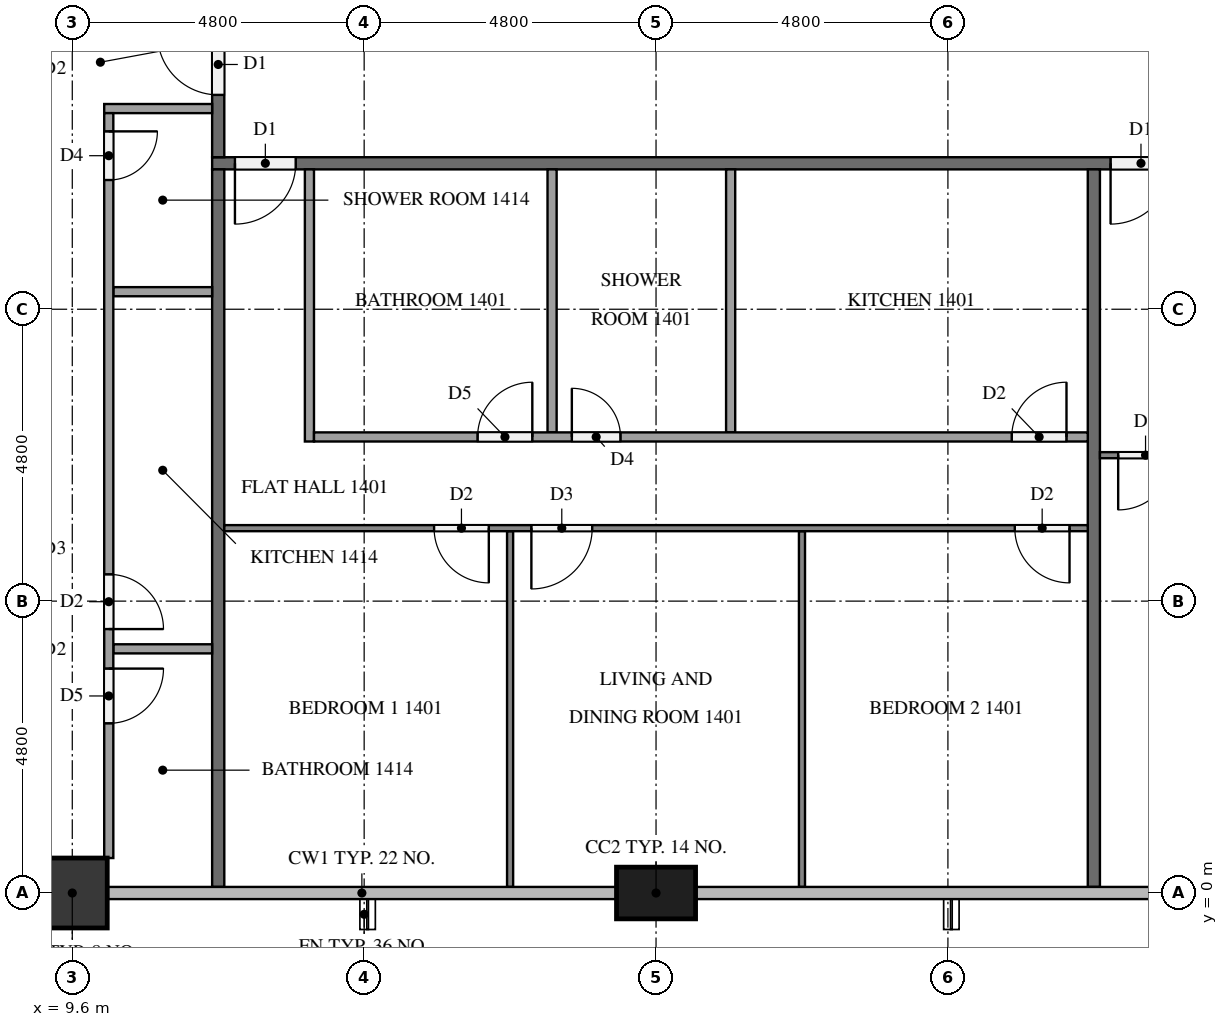
"""IFC4 building model, lengths in metres.
Left out: names, types, materials, properties, quantities, classifications, styles, units other than length and angle.
Written with IfcOpenShell. Run it as: python <this file> out.ifc"""

import sys

from ifc_helpers import new_model, si_unit, direction, frame, frame_2d, origin, origin_2d, place, context, subcontext, project, spatial, rectangle, extrude, element, fill, save


model = new_model("IFC4")
c1 = context("Model", 3, precision=1e-05, world=origin(), true_north=direction((0.0, 1.0)))
c2 = subcontext(c1, "Body", "Model", "MODEL_VIEW")
j1 = project(units=[si_unit("LENGTHUNIT", "METRE"), si_unit("PLANEANGLEUNIT", "RADIAN")], contexts=[c1])
p1 = place(None, origin())
s1 = spatial("IfcSite", under=j1, at=p1, CompositionType="ELEMENT")
p2 = place(p1, origin())
s2 = spatial("IfcBuilding", under=s1, at=p2, CompositionType="ELEMENT")
p3 = place(p2, frame((0.0, 0.0, 59.3)))
s3 = spatial("IfcBuildingStorey", under=s2, at=p3, CompositionType="ELEMENT", Elevation=59.3)
p4 = place(p3, frame((9.6, 0.0, 0.0), z_axis=(0.0, 0.0, 1.0), x_axis=(1.0, 0.0, 0.0)))
e1 = element("IfcColumn", 1, at=p4, inside=s3, PredefinedType="COLUMN", context=c2, shape_type="SweptSolid", body=[
    extrude(rectangle(XDim=1.15, YDim=1.15, at=origin_2d()), origin(), (0.0, 0.0, 1.0), 3.2),
])
p5 = place(p3, frame((19.2, 0.0, 0.0), z_axis=(0.0, 0.0, 1.0), x_axis=(1.0, 0.0, 0.0)))
e2 = element("IfcColumn", 2, at=p5, inside=s3, PredefinedType="COLUMN", context=c2, shape_type="SweptSolid", body=[
    extrude(rectangle(XDim=1.3, YDim=0.85, at=origin_2d()), origin(), (0.0, 0.0, 1.0), 3.2),
])
p6 = place(p3, frame((50.5, 12.0, 0.0), z_axis=(0.0, 0.0, 1.0), x_axis=(-1.0, 0.0, 0.0)))
e3 = element("IfcWall", 3, at=p6, inside=s3, PredefinedType="PARTITIONING", context=c2, shape_type="SweptSolid", body=[
    extrude(rectangle(XDim=38.6, YDim=0.2, at=frame_2d((19.3, 0.0))), origin(), (0.0, 0.0, 1.0), 3.2),
])
p7 = place(p6, frame((37.225, 0.0, 0.0)))
e4 = element("IfcOpeningElement", 4, at=p7, cuts=e3, PredefinedType="OPENING", context=c2, shape_type="SweptSolid", body=[
    extrude(rectangle(XDim=1.0, YDim=2.1, at=frame_2d((0.5, 1.05))), frame((0.0, 0.11, 0.0), z_axis=(0.0, -1.0, 0.0), x_axis=(1.0, 0.0, 0.0)), (0.0, 0.0, 1.0), 0.22),
])
p8 = place(p6, frame((22.825, 0.0, 0.0)))
e5 = element("IfcOpeningElement", 5, at=p8, cuts=e3, PredefinedType="OPENING", context=c2, shape_type="SweptSolid", body=[
    extrude(rectangle(XDim=1.0, YDim=2.1, at=frame_2d((0.5, 1.05))), frame((0.0, 0.11, 0.0), z_axis=(0.0, -1.0, 0.0), x_axis=(1.0, 0.0, 0.0)), (0.0, 0.0, 1.0), 0.22),
])
p9 = place(p6, frame((0.375, 0.0, 0.0)))
e6 = element("IfcOpeningElement", 6, at=p9, cuts=e3, PredefinedType="OPENING", context=c2, shape_type="SweptSolid", body=[
    extrude(rectangle(XDim=1.0, YDim=2.1, at=frame_2d((0.5, 1.05))), frame((0.0, 0.11, 0.0), z_axis=(0.0, -1.0, 0.0), x_axis=(1.0, 0.0, 0.0)), (0.0, 0.0, 1.0), 0.22),
])
p10 = place(p3, frame((12.0, 12.1, 0.0), z_axis=(0.0, 0.0, 1.0), x_axis=(0.0, 1.0, 0.0)))
e7 = element("IfcWall", 7, at=p10, inside=s3, PredefinedType="PARTITIONING", context=c2, shape_type="SweptSolid", body=[
    extrude(rectangle(XDim=28.6, YDim=0.2, at=frame_2d((14.3, 0.0))), origin(), (0.0, 0.0, 1.0), 3.2),
])
p11 = place(p10, frame((19.375, 0.0, 0.0)))
e8 = element("IfcOpeningElement", 8, at=p11, cuts=e7, PredefinedType="OPENING", context=c2, shape_type="SweptSolid", body=[
    extrude(rectangle(XDim=1.0, YDim=2.1, at=frame_2d((0.5, 1.05))), frame((0.0, 0.11, 0.0), z_axis=(0.0, -1.0, 0.0), x_axis=(1.0, 0.0, 0.0)), (0.0, 0.0, 1.0), 0.22),
])
p12 = place(p10, frame((12.175, 0.0, 0.0)))
e9 = element("IfcOpeningElement", 9, at=p12, cuts=e7, PredefinedType="OPENING", context=c2, shape_type="SweptSolid", body=[
    extrude(rectangle(XDim=1.0, YDim=2.1, at=frame_2d((0.5, 1.05))), frame((0.0, 0.11, 0.0), z_axis=(0.0, -1.0, 0.0), x_axis=(1.0, 0.0, 0.0)), (0.0, 0.0, 1.0), 0.22),
])
p13 = place(p10, frame((2.575, 0.0, 0.0)))
e10 = element("IfcOpeningElement", 10, at=p13, cuts=e7, PredefinedType="OPENING", context=c2, shape_type="SweptSolid", body=[
    extrude(rectangle(XDim=1.0, YDim=2.1, at=frame_2d((0.5, 1.05))), frame((0.0, 0.11, 0.0), z_axis=(0.0, -1.0, 0.0), x_axis=(1.0, 0.0, 0.0)), (0.0, 0.0, 1.0), 0.22),
])
p14 = place(p10, frame((1.025, 0.0, 0.0)))
e11 = element("IfcOpeningElement", 11, at=p14, cuts=e7, PredefinedType="OPENING", context=c2, shape_type="SweptSolid", body=[
    extrude(rectangle(XDim=1.0, YDim=2.1, at=frame_2d((0.5, 1.05))), frame((0.0, 0.11, 0.0), z_axis=(0.0, -1.0, 0.0), x_axis=(1.0, 0.0, 0.0)), (0.0, 0.0, 1.0), 0.22),
])
for number, where, z_axis, x_axis in (
    (12, (26.4, 11.9, 0.0), (0.0, 0.0, 1.0), (0.0, -1.0, 0.0)),
    (13, (12.0, 0.1, 0.0), (0.0, 0.0, 1.0), (0.0, 1.0, 0.0)),
):
    element("IfcWall", number, at=place(p3, frame(where, z_axis=z_axis, x_axis=x_axis)), inside=s3, PredefinedType="PARTITIONING", context=c2, shape_type="SweptSolid", body=[
        extrude(rectangle(XDim=11.8, YDim=0.2, at=frame_2d((5.9, 0.0))), origin(), (0.0, 0.0, 1.0), 3.2),
    ])
for number, where, z_axis, x_axis in (
    (14, (16.8, 5.95, 0.0), (0.0, 0.0, 1.0), (0.0, -1.0, 0.0)),
    (15, (21.6, 5.95, 0.0), (0.0, 0.0, 1.0), (0.0, -1.0, 0.0)),
):
    element("IfcWall", number, at=place(p3, frame(where, z_axis=z_axis, x_axis=x_axis)), inside=s3, PredefinedType="PARTITIONING", context=c2, shape_type="SweptSolid", body=[
        extrude(rectangle(XDim=5.85, YDim=0.1, at=frame_2d((2.925, 0.0))), origin(), (0.0, 0.0, 1.0), 3.2),
    ])
p15 = place(p3, frame((26.3, 6.0, 0.0), z_axis=(0.0, 0.0, 1.0), x_axis=(-1.0, 0.0, 0.0)))
e16 = element("IfcWall", 16, at=p15, inside=s3, PredefinedType="PARTITIONING", context=c2, shape_type="SweptSolid", body=[
    extrude(rectangle(XDim=14.2, YDim=0.1, at=frame_2d((7.1, 0.0))), origin(), (0.0, 0.0, 1.0), 3.2),
])
p16 = place(p15, frame((9.85, 0.0, 0.0)))
e17 = element("IfcOpeningElement", 17, at=p16, cuts=e16, PredefinedType="OPENING", context=c2, shape_type="SweptSolid", body=[
    extrude(rectangle(XDim=0.9, YDim=2.1, at=frame_2d((0.45, 1.05))), frame((0.0, 0.06, 0.0), z_axis=(0.0, -1.0, 0.0), x_axis=(1.0, 0.0, 0.0)), (0.0, 0.0, 1.0), 0.12),
])
p17 = place(p15, frame((8.15, 0.0, 0.0)))
e18 = element("IfcOpeningElement", 18, at=p17, cuts=e16, PredefinedType="OPENING", context=c2, shape_type="SweptSolid", body=[
    extrude(rectangle(XDim=1.0, YDim=2.1, at=frame_2d((0.5, 1.05))), frame((0.0, 0.06, 0.0), z_axis=(0.0, -1.0, 0.0), x_axis=(1.0, 0.0, 0.0)), (0.0, 0.0, 1.0), 0.12),
])
p18 = place(p15, frame((0.3, 0.0, 0.0)))
e19 = element("IfcOpeningElement", 19, at=p18, cuts=e16, PredefinedType="OPENING", context=c2, shape_type="SweptSolid", body=[
    extrude(rectangle(XDim=0.9, YDim=2.1, at=frame_2d((0.45, 1.05))), frame((0.0, 0.06, 0.0), z_axis=(0.0, -1.0, 0.0), x_axis=(1.0, 0.0, 0.0)), (0.0, 0.0, 1.0), 0.12),
])
for number, where, z_axis, x_axis in (
    (20, (17.49, 11.9, 0.0), (0.0, 0.0, 1.0), (0.0, -1.0, 0.0)),
    (21, (20.427, 11.9, 0.0), (0.0, 0.0, 1.0), (0.0, -1.0, 0.0)),
):
    element("IfcWall", number, at=place(p3, frame(where, z_axis=z_axis, x_axis=x_axis)), inside=s3, PredefinedType="PARTITIONING", context=c2, shape_type="SweptSolid", body=[
        extrude(rectangle(XDim=4.325, YDim=0.15, at=frame_2d((2.163, 0.0))), origin(), (0.0, 0.0, 1.0), 3.2),
    ])
p19 = place(p3, frame((13.5, 11.9, 0.0), z_axis=(0.0, 0.0, 1.0), x_axis=(0.0, -1.0, 0.0)))
e22 = element("IfcWall", 22, at=p19, inside=s3, PredefinedType="PARTITIONING", context=c2, shape_type="SweptSolid", body=[
    extrude(rectangle(XDim=4.475, YDim=0.15, at=frame_2d((2.237, 0.0))), origin(), (0.0, 0.0, 1.0), 3.2),
])
p20 = place(p3, frame((13.575, 7.5, 0.0), z_axis=(0.0, 0.0, 1.0), x_axis=(1.0, 0.0, 0.0)))
e23 = element("IfcWall", 23, at=p20, inside=s3, PredefinedType="PARTITIONING", context=c2, shape_type="SweptSolid", body=[
    extrude(rectangle(XDim=12.725, YDim=0.15, at=frame_2d((6.363, 0.0))), origin(), (0.0, 0.0, 1.0), 3.2),
])
p21 = place(p20, frame((2.69, 0.0, 0.0)))
e24 = element("IfcOpeningElement", 24, at=p21, cuts=e23, PredefinedType="OPENING", context=c2, shape_type="SweptSolid", body=[
    extrude(rectangle(XDim=0.9, YDim=2.1, at=frame_2d((0.45, 1.05))), frame((0.0, 0.085, 0.0), z_axis=(0.0, -1.0, 0.0), x_axis=(1.0, 0.0, 0.0)), (0.0, 0.0, 1.0), 0.17),
])
p22 = place(p20, frame((4.24, 0.0, 0.0)))
e25 = element("IfcOpeningElement", 25, at=p22, cuts=e23, PredefinedType="OPENING", context=c2, shape_type="SweptSolid", body=[
    extrude(rectangle(XDim=0.8, YDim=2.1, at=frame_2d((0.4, 1.05))), frame((0.0, 0.085, 0.0), z_axis=(0.0, -1.0, 0.0), x_axis=(1.0, 0.0, 0.0)), (0.0, 0.0, 1.0), 0.17),
])
p23 = place(p20, frame((11.475, 0.0, 0.0)))
e26 = element("IfcOpeningElement", 26, at=p23, cuts=e23, PredefinedType="OPENING", context=c2, shape_type="SweptSolid", body=[
    extrude(rectangle(XDim=0.9, YDim=2.1, at=frame_2d((0.45, 1.05))), frame((0.0, 0.085, 0.0), z_axis=(0.0, -1.0, 0.0), x_axis=(1.0, 0.0, 0.0)), (0.0, 0.0, 1.0), 0.17),
])
p24 = place(p3, frame((40.7, 7.2, 0.0), z_axis=(0.0, 0.0, 1.0), x_axis=(-1.0, 0.0, 0.0)))
e27 = element("IfcWall", 27, at=p24, inside=s3, PredefinedType="PARTITIONING", context=c2, shape_type="SweptSolid", body=[
    extrude(rectangle(XDim=14.2, YDim=0.1, at=frame_2d((7.1, 0.0))), origin(), (0.0, 0.0, 1.0), 3.2),
])
p25 = place(p24, frame((13.0, 0.0, 0.0)))
e28 = element("IfcOpeningElement", 28, at=p25, cuts=e27, PredefinedType="OPENING", context=c2, shape_type="SweptSolid", body=[
    extrude(rectangle(XDim=0.9, YDim=2.1, at=frame_2d((0.45, 1.05))), frame((0.0, 0.06, 0.0), z_axis=(0.0, -1.0, 0.0), x_axis=(1.0, 0.0, 0.0)), (0.0, 0.0, 1.0), 0.12),
])
p26 = place(p24, frame((5.05, 0.0, 0.0)))
e29 = element("IfcOpeningElement", 29, at=p26, cuts=e27, PredefinedType="OPENING", context=c2, shape_type="SweptSolid", body=[
    extrude(rectangle(XDim=1.0, YDim=2.1, at=frame_2d((0.5, 1.05))), frame((0.0, 0.06, 0.0), z_axis=(0.0, -1.0, 0.0), x_axis=(1.0, 0.0, 0.0)), (0.0, 0.0, 1.0), 0.12),
])
p27 = place(p24, frame((3.45, 0.0, 0.0)))
e30 = element("IfcOpeningElement", 30, at=p27, cuts=e27, PredefinedType="OPENING", context=c2, shape_type="SweptSolid", body=[
    extrude(rectangle(XDim=0.9, YDim=2.1, at=frame_2d((0.45, 1.05))), frame((0.0, 0.06, 0.0), z_axis=(0.0, -1.0, 0.0), x_axis=(1.0, 0.0, 0.0)), (0.0, 0.0, 1.0), 0.12),
])
for number, where, z_axis, x_axis in (
    (31, (11.9, 9.888, 0.0), (0.0, 0.0, 1.0), (-1.0, 0.0, 0.0)),
    (32, (11.9, 4.015, 0.0), (0.0, 0.0, 1.0), (-1.0, 0.0, 0.0)),
):
    element("IfcWall", number, at=place(p3, frame(where, z_axis=z_axis, x_axis=x_axis)), inside=s3, PredefinedType="PARTITIONING", context=c2, shape_type="SweptSolid", body=[
        extrude(rectangle(XDim=1.625, YDim=0.15, at=frame_2d((0.812, 0.0))), origin(), (0.0, 0.0, 1.0), 3.2),
    ])
p28 = place(p3, frame((11.9, 12.9, 0.0), z_axis=(0.0, 0.0, 1.0), x_axis=(-1.0, 0.0, 0.0)))
e33 = element("IfcWall", 33, at=p28, inside=s3, PredefinedType="PARTITIONING", context=c2, shape_type="SweptSolid", body=[
    extrude(rectangle(XDim=1.775, YDim=0.15, at=frame_2d((0.887, 0.0))), origin(), (0.0, 0.0, 1.0), 3.2),
])
p29 = place(p3, frame((10.2, 12.825, 0.0), z_axis=(0.0, 0.0, 1.0), x_axis=(0.0, -1.0, 0.0)))
e34 = element("IfcWall", 34, at=p29, inside=s3, PredefinedType="PARTITIONING", context=c2, shape_type="SweptSolid", body=[
    extrude(rectangle(XDim=12.25, YDim=0.15, at=frame_2d((6.125, 0.0))), origin(), (0.0, 0.0, 1.0), 3.2),
])
p30 = place(p29, frame((0.3, 0.0, 0.0)))
e35 = element("IfcOpeningElement", 35, at=p30, cuts=e34, PredefinedType="OPENING", context=c2, shape_type="SweptSolid", body=[
    extrude(rectangle(XDim=0.8, YDim=2.1, at=frame_2d((0.4, 1.05))), frame((0.0, 0.085, 0.0), z_axis=(0.0, -1.0, 0.0), x_axis=(1.0, 0.0, 0.0)), (0.0, 0.0, 1.0), 0.17),
])
p31 = place(p29, frame((7.585, 0.0, 0.0)))
e36 = element("IfcOpeningElement", 36, at=p31, cuts=e34, PredefinedType="OPENING", context=c2, shape_type="SweptSolid", body=[
    extrude(rectangle(XDim=0.9, YDim=2.1, at=frame_2d((0.45, 1.05))), frame((0.0, 0.085, 0.0), z_axis=(0.0, -1.0, 0.0), x_axis=(1.0, 0.0, 0.0)), (0.0, 0.0, 1.0), 0.17),
])
p32 = place(p29, frame((9.135, 0.0, 0.0)))
e37 = element("IfcOpeningElement", 37, at=p32, cuts=e34, PredefinedType="OPENING", context=c2, shape_type="SweptSolid", body=[
    extrude(rectangle(XDim=0.9, YDim=2.1, at=frame_2d((0.45, 1.05))), frame((0.0, 0.085, 0.0), z_axis=(0.0, -1.0, 0.0), x_axis=(1.0, 0.0, 0.0)), (0.0, 0.0, 1.0), 0.17),
])
p33 = place(p7, origin())
e38 = element("IfcDoor", 38, at=p33, inside=s3, OperationType="SINGLE_SWING_RIGHT", PredefinedType="DOOR", context=c2, shape_type="SweptSolid", body=[
    extrude(rectangle(XDim=1.0, YDim=2.1, at=frame_2d((0.5, 1.05))), frame((0.0, 0.025, 0.0), z_axis=(0.0, -1.0, 0.0), x_axis=(1.0, 0.0, 0.0)), (0.0, 0.0, 1.0), 0.05),
])
fill(e4, e38)
p34 = place(p8, origin())
e39 = element("IfcDoor", 39, at=p34, inside=s3, OperationType="SINGLE_SWING_RIGHT", PredefinedType="DOOR", context=c2, shape_type="SweptSolid", body=[
    extrude(rectangle(XDim=1.0, YDim=2.1, at=frame_2d((0.5, 1.05))), frame((0.0, 0.025, 0.0), z_axis=(0.0, -1.0, 0.0), x_axis=(1.0, 0.0, 0.0)), (0.0, 0.0, 1.0), 0.05),
])
fill(e5, e39)
p35 = place(p14, origin())
e40 = element("IfcDoor", 40, at=p35, inside=s3, OperationType="SINGLE_SWING_RIGHT", PredefinedType="DOOR", context=c2, shape_type="SweptSolid", body=[
    extrude(rectangle(XDim=1.0, YDim=2.1, at=frame_2d((0.5, 1.05))), frame((0.0, 0.025, 0.0), z_axis=(0.0, -1.0, 0.0), x_axis=(1.0, 0.0, 0.0)), (0.0, 0.0, 1.0), 0.05),
])
fill(e11, e40)
p36 = place(p16, origin())
e41 = element("IfcDoor", 41, at=p36, inside=s3, OperationType="SINGLE_SWING_LEFT", PredefinedType="DOOR", context=c2, shape_type="SweptSolid", body=[
    extrude(rectangle(XDim=0.9, YDim=2.1, at=frame_2d((0.45, 1.05))), frame((0.0, 0.025, 0.0), z_axis=(0.0, -1.0, 0.0), x_axis=(1.0, 0.0, 0.0)), (0.0, 0.0, 1.0), 0.05),
])
fill(e17, e41)
p37 = place(p17, origin())
e42 = element("IfcDoor", 42, at=p37, inside=s3, OperationType="SINGLE_SWING_RIGHT", PredefinedType="DOOR", context=c2, shape_type="SweptSolid", body=[
    extrude(rectangle(XDim=1.0, YDim=2.1, at=frame_2d((0.5, 1.05))), frame((0.0, 0.025, 0.0), z_axis=(0.0, -1.0, 0.0), x_axis=(1.0, 0.0, 0.0)), (0.0, 0.0, 1.0), 0.05),
])
fill(e18, e42)
p38 = place(p18, origin())
e43 = element("IfcDoor", 43, at=p38, inside=s3, OperationType="SINGLE_SWING_LEFT", PredefinedType="DOOR", context=c2, shape_type="SweptSolid", body=[
    extrude(rectangle(XDim=0.9, YDim=2.1, at=frame_2d((0.45, 1.05))), frame((0.0, 0.025, 0.0), z_axis=(0.0, -1.0, 0.0), x_axis=(1.0, 0.0, 0.0)), (0.0, 0.0, 1.0), 0.05),
])
fill(e19, e43)
p39 = place(p21, origin())
e44 = element("IfcDoor", 44, at=p39, inside=s3, OperationType="SINGLE_SWING_RIGHT", PredefinedType="DOOR", context=c2, shape_type="SweptSolid", body=[
    extrude(rectangle(XDim=0.9, YDim=2.1, at=frame_2d((0.45, 1.05))), frame((0.0, 0.025, 0.0), z_axis=(0.0, -1.0, 0.0), x_axis=(1.0, 0.0, 0.0)), (0.0, 0.0, 1.0), 0.05),
])
fill(e24, e44)
p40 = place(p22, origin())
e45 = element("IfcDoor", 45, at=p40, inside=s3, OperationType="SINGLE_SWING_LEFT", PredefinedType="DOOR", context=c2, shape_type="SweptSolid", body=[
    extrude(rectangle(XDim=0.8, YDim=2.1, at=frame_2d((0.4, 1.05))), frame((0.0, 0.025, 0.0), z_axis=(0.0, -1.0, 0.0), x_axis=(1.0, 0.0, 0.0)), (0.0, 0.0, 1.0), 0.05),
])
fill(e25, e45)
p41 = place(p23, origin())
e46 = element("IfcDoor", 46, at=p41, inside=s3, OperationType="SINGLE_SWING_RIGHT", PredefinedType="DOOR", context=c2, shape_type="SweptSolid", body=[
    extrude(rectangle(XDim=0.9, YDim=2.1, at=frame_2d((0.45, 1.05))), frame((0.0, 0.025, 0.0), z_axis=(0.0, -1.0, 0.0), x_axis=(1.0, 0.0, 0.0)), (0.0, 0.0, 1.0), 0.05),
])
fill(e26, e46)
p42 = place(p25, origin())
e47 = element("IfcDoor", 47, at=p42, inside=s3, OperationType="SINGLE_SWING_RIGHT", PredefinedType="DOOR", context=c2, shape_type="SweptSolid", body=[
    extrude(rectangle(XDim=0.9, YDim=2.1, at=frame_2d((0.45, 1.05))), frame((0.0, 0.025, 0.0), z_axis=(0.0, -1.0, 0.0), x_axis=(1.0, 0.0, 0.0)), (0.0, 0.0, 1.0), 0.05),
])
fill(e28, e47)
p43 = place(p30, origin())
e48 = element("IfcDoor", 48, at=p43, inside=s3, OperationType="SINGLE_SWING_LEFT", PredefinedType="DOOR", context=c2, shape_type="SweptSolid", body=[
    extrude(rectangle(XDim=0.8, YDim=2.1, at=frame_2d((0.4, 1.05))), frame((0.0, 0.025, 0.0), z_axis=(0.0, -1.0, 0.0), x_axis=(1.0, 0.0, 0.0)), (0.0, 0.0, 1.0), 0.05),
])
fill(e35, e48)
p44 = place(p31, origin())
e49 = element("IfcDoor", 49, at=p44, inside=s3, OperationType="SINGLE_SWING_RIGHT", PredefinedType="DOOR", context=c2, shape_type="SweptSolid", body=[
    extrude(rectangle(XDim=0.9, YDim=2.1, at=frame_2d((0.45, 1.05))), frame((0.0, 0.025, 0.0), z_axis=(0.0, -1.0, 0.0), x_axis=(1.0, 0.0, 0.0)), (0.0, 0.0, 1.0), 0.05),
])
fill(e36, e49)
p45 = place(p32, origin())
e50 = element("IfcDoor", 50, at=p45, inside=s3, OperationType="SINGLE_SWING_LEFT", PredefinedType="DOOR", context=c2, shape_type="SweptSolid", body=[
    extrude(rectangle(XDim=0.9, YDim=2.1, at=frame_2d((0.45, 1.05))), frame((0.0, 0.025, 0.0), z_axis=(0.0, -1.0, 0.0), x_axis=(1.0, 0.0, 0.0)), (0.0, 0.0, 1.0), 0.05),
])
fill(e37, e50)
save(model, sys.argv[1])
